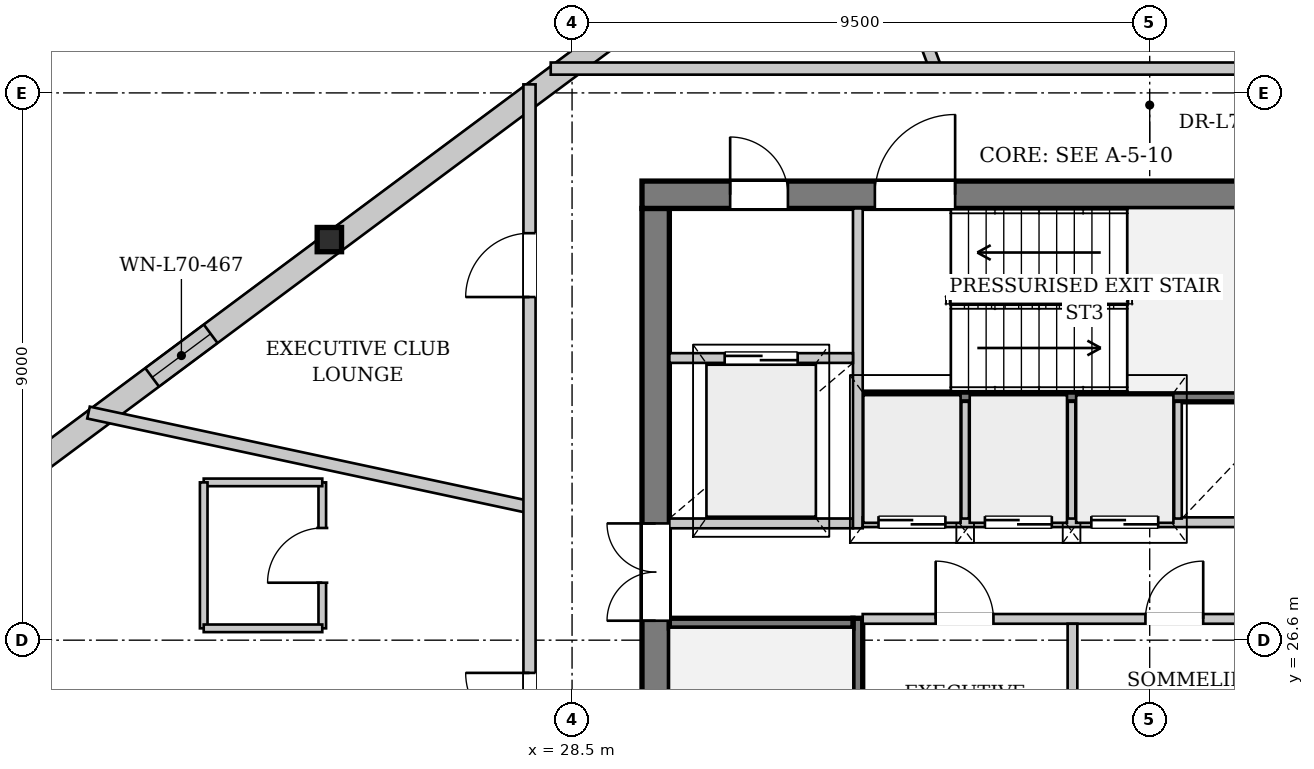
"""IFC4 building model, lengths in metres.
Left out: names, types, materials, properties, quantities, classifications, styles, units other than length and angle.
Written with IfcOpenShell. Run it as: python <this file> out.ifc"""

import sys

from ifc_helpers import new_model, si_unit, direction, frame, frame_2d, origin, origin_2d, place, context, subcontext, project, spatial, rectangle, i_section, extrude, source, transform, mapped, element, fill, save


model = new_model("IFC4")
c1 = context("Model", 3, precision=1e-05, world=origin(), true_north=direction((0.0, 1.0)))
c2 = subcontext(c1, "Body", "Model", "MODEL_VIEW")
j1 = project(units=[si_unit("LENGTHUNIT", "METRE"), si_unit("PLANEANGLEUNIT", "RADIAN")], contexts=[c1])
p1 = place(None, origin())
s1 = spatial("IfcSite", under=j1, at=p1, CompositionType="ELEMENT")
p2 = place(p1, origin())
s2 = spatial("IfcBuilding", under=s1, at=p2, CompositionType="ELEMENT")
p3 = place(p2, frame((0.0, 0.0, 263.3)))
s3 = spatial("IfcBuildingStorey", under=s2, at=p3, CompositionType="ELEMENT", Elevation=263.3)
m1 = source(origin(), c2, "Body", "SweptSolid", [
    extrude(i_section(OverallWidth=0.401, OverallDepth=0.399, WebThickness=0.022, FlangeThickness=0.034, at=origin_2d()), origin(), (0.0, 0.0, 1.0), 3.449),
])
p4 = place(p3, frame((24.526, 33.341, 0.0), z_axis=(-0.010051977317, -0.088839658682, 0.995995217256), x_axis=(0.99365964574, -0.112430015693, 0.0)))
e1 = element("IfcColumn", 1, at=p4, inside=s3, PredefinedType="COLUMN", context=c2, shape_type="MappedRepresentation", body=[
    mapped(m1, transform((0.0, 0.0, 0.0), x_axis=(1.0, 0.0, 0.0), y_axis=(0.0, 1.0, 0.0), z_axis=(0.0, 0.0, 1.0), scale=1.0)),
])
p5 = place(p3, frame((15.894, 26.68, 0.0), z_axis=(0.0, 0.0, 1.0), x_axis=(0.802229105353, 0.59701630005, 0.0)))
e2 = element("IfcWall", 2, at=p5, inside=s3, PredefinedType="SOLIDWALL", context=c2, shape_type="SweptSolid", body=[
    extrude(rectangle(XDim=21.802, YDim=0.38, at=frame_2d((10.901, 0.0))), origin(), (0.0, 0.0, 1.0), 2.872),
])
p6 = place(p5, frame((7.105, 0.0, 0.65)))
e3 = element("IfcOpeningElement", 3, at=p6, cuts=e2, PredefinedType="OPENING", context=c2, shape_type="SweptSolid", body=[
    extrude(rectangle(XDim=1.2, YDim=1.5, at=frame_2d((0.6, 0.75))), frame((0.0, 0.2, 0.0), z_axis=(0.0, -1.0, 0.0), x_axis=(1.0, 0.0, 0.0)), (0.0, 0.0, 1.0), 0.4),
])
p7 = place(p5, frame((16.698, 0.0, 0.65)))
e4 = element("IfcOpeningElement", 4, at=p7, cuts=e2, PredefinedType="OPENING", context=c2, shape_type="SweptSolid", body=[
    extrude(rectangle(XDim=1.2, YDim=1.5, at=frame_2d((0.6, 0.75))), frame((0.0, 0.2, 0.0), z_axis=(0.0, -1.0, 0.0), x_axis=(1.0, 0.0, 0.0)), (0.0, 0.0, 1.0), 0.4),
])
p8 = place(p3, frame((29.875, 19.5, 0.0), z_axis=(0.0, 0.0, 1.0), x_axis=(0.0, 1.0, 0.0)))
e5 = element("IfcWall", 5, at=p8, inside=s3, PredefinedType="SHEAR", context=c2, shape_type="SweptSolid", body=[
    extrude(rectangle(XDim=14.2, YDim=0.45, at=frame_2d((7.1, 0.0))), origin(), (0.0, 0.0, 1.0), 3.38),
])
p9 = place(p8, frame((7.42, 0.0, 0.0)))
e6 = element("IfcOpeningElement", 6, at=p9, cuts=e5, PredefinedType="OPENING", context=c2, shape_type="SweptSolid", body=[
    extrude(rectangle(XDim=1.6, YDim=2.2, at=frame_2d((0.8, 1.1))), frame((0.0, 0.235, 0.0), z_axis=(0.0, -1.0, 0.0), x_axis=(1.0, 0.0, 0.0)), (0.0, 0.0, 1.0), 0.47),
])
p10 = place(p3, frame((29.65, 33.925, 0.0), z_axis=(0.0, 0.0, 1.0), x_axis=(1.0, 0.0, 0.0)))
e7 = element("IfcWall", 7, at=p10, inside=s3, PredefinedType="SHEAR", context=c2, shape_type="SweptSolid", body=[
    extrude(rectangle(XDim=16.7, YDim=0.45, at=frame_2d((8.35, 0.0))), origin(), (0.0, 0.0, 1.0), 3.38),
])
p11 = place(p10, frame((1.45, 0.0, 0.0)))
e8 = element("IfcOpeningElement", 8, at=p11, cuts=e7, PredefinedType="OPENING", context=c2, shape_type="SweptSolid", body=[
    extrude(rectangle(XDim=0.95, YDim=2.1, at=frame_2d((0.475, 1.05))), frame((0.0, 0.235, 0.0), z_axis=(0.0, -1.0, 0.0), x_axis=(1.0, 0.0, 0.0)), (0.0, 0.0, 1.0), 0.47),
])
p12 = place(p10, frame((3.83, 0.0, 0.0)))
e9 = element("IfcOpeningElement", 9, at=p12, cuts=e7, PredefinedType="OPENING", context=c2, shape_type="SweptSolid", body=[
    extrude(rectangle(XDim=1.32, YDim=2.2, at=frame_2d((0.66, 1.1))), frame((0.0, 0.235, 0.0), z_axis=(0.0, -1.0, 0.0), x_axis=(1.0, 0.0, 0.0)), (0.0, 0.0, 1.0), 0.47),
])
p13 = place(p3, frame((33.2, 19.5, 0.0), z_axis=(0.0, 0.0, 1.0), x_axis=(0.0, 1.0, 0.0)))
e10 = element("IfcWall", 10, at=p13, inside=s3, PredefinedType="PARTITIONING", context=c2, shape_type="SweptSolid", body=[
    extrude(rectangle(XDim=7.46, YDim=0.16, at=frame_2d((3.73, 0.0))), origin(), (0.0, 0.0, 1.0), 3.38),
])
p14 = place(p13, frame((0.08, 0.0, 0.0)))
e11 = element("IfcOpeningElement", 11, at=p14, cuts=e10, PredefinedType="OPENING", context=c2, shape_type="SweptSolid", body=[
    extrude(rectangle(XDim=1.32, YDim=2.2, at=frame_2d((0.66, 1.1))), frame((0.0, 0.09, 0.0), z_axis=(0.0, -1.0, 0.0), x_axis=(1.0, 0.0, 0.0)), (0.0, 0.0, 1.0), 0.18),
])
p15 = place(p3, frame((30.1, 26.88, 0.0), z_axis=(0.0, 0.0, 1.0), x_axis=(1.0, 0.0, 0.0)))
e12 = element("IfcWall", 12, at=p15, inside=s3, PredefinedType="PARTITIONING", context=c2, shape_type="SweptSolid", body=[
    extrude(rectangle(XDim=3.02, YDim=0.16, at=frame_2d((1.51, 0.0))), origin(), (0.0, 0.0, 1.0), 3.38),
])
p16 = place(p3, frame((33.28, 30.6, 0.0), z_axis=(0.0, 0.0, 1.0), x_axis=(1.0, 0.0, 0.0)))
e13 = element("IfcWall", 13, at=p16, inside=s3, PredefinedType="PARTITIONING", context=c2, shape_type="SweptSolid", body=[
    extrude(rectangle(XDim=7.3, YDim=0.16, at=frame_2d((3.65, 0.0))), origin(), (0.0, 0.0, 1.0), 3.38),
])
p17 = place(p3, frame((30.1, 28.52, 0.0), z_axis=(0.0, 0.0, 1.0), x_axis=(1.0, 0.0, 0.0)))
e14 = element("IfcWall", 14, at=p17, inside=s3, PredefinedType="PARTITIONING", context=c2, shape_type="SweptSolid", body=[
    extrude(rectangle(XDim=3.02, YDim=0.16, at=frame_2d((1.51, 0.0))), origin(), (0.0, 0.0, 1.0), 3.38),
])
p18 = place(p3, frame((33.2, 28.44, 0.0), z_axis=(0.0, 0.0, 1.0), x_axis=(0.0, 1.0, 0.0)))
e15 = element("IfcWall", 15, at=p18, inside=s3, PredefinedType="PARTITIONING", context=c2, shape_type="SweptSolid", body=[
    extrude(rectangle(XDim=5.26, YDim=0.16, at=frame_2d((2.63, 0.0))), origin(), (0.0, 0.0, 1.0), 3.38),
])
p19 = place(p3, frame((30.1, 31.24, 0.0), z_axis=(0.0, 0.0, 1.0), x_axis=(1.0, 0.0, 0.0)))
e16 = element("IfcWall", 16, at=p19, inside=s3, PredefinedType="PARTITIONING", context=c2, shape_type="SweptSolid", body=[
    extrude(rectangle(XDim=3.02, YDim=0.16, at=frame_2d((1.51, 0.0))), origin(), (0.0, 0.0, 1.0), 3.38),
])
p20 = place(p19, frame((0.91, 0.0, 0.0)))
e17 = element("IfcOpeningElement", 17, at=p20, cuts=e16, PredefinedType="OPENING", context=c2, shape_type="SweptSolid", body=[
    extrude(rectangle(XDim=1.2, YDim=2.2, at=frame_2d((0.6, 1.1))), frame((0.0, 0.09, 0.0), z_axis=(0.0, -1.0, 0.0), x_axis=(1.0, 0.0, 0.0)), (0.0, 0.0, 1.0), 0.18),
])
p21 = place(p3, frame((33.28, 26.95, 0.0), z_axis=(0.0, 0.0, 1.0), x_axis=(1.0, 0.0, 0.0)))
e18 = element("IfcWall", 18, at=p21, inside=s3, PredefinedType="PARTITIONING", context=c2, shape_type="SweptSolid", body=[
    extrude(rectangle(XDim=9.44, YDim=0.16, at=frame_2d((4.72, 0.0))), origin(), (0.0, 0.0, 1.0), 3.38),
])
p22 = place(p21, frame((1.2, 0.0, 0.0)))
e19 = element("IfcOpeningElement", 19, at=p22, cuts=e18, PredefinedType="OPENING", context=c2, shape_type="SweptSolid", body=[
    extrude(rectangle(XDim=0.95, YDim=2.1, at=frame_2d((0.475, 1.05))), frame((0.0, 0.09, 0.0), z_axis=(0.0, -1.0, 0.0), x_axis=(1.0, 0.0, 0.0)), (0.0, 0.0, 1.0), 0.18),
])
p23 = place(p21, frame((4.65, 0.0, 0.0)))
e20 = element("IfcOpeningElement", 20, at=p23, cuts=e18, PredefinedType="OPENING", context=c2, shape_type="SweptSolid", body=[
    extrude(rectangle(XDim=0.95, YDim=2.1, at=frame_2d((0.475, 1.05))), frame((0.0, 0.09, 0.0), z_axis=(0.0, -1.0, 0.0), x_axis=(1.0, 0.0, 0.0)), (0.0, 0.0, 1.0), 0.18),
])
p24 = place(p21, frame((7.67, 0.0, 0.0)))
e21 = element("IfcOpeningElement", 21, at=p24, cuts=e18, PredefinedType="OPENING", context=c2, shape_type="SweptSolid", body=[
    extrude(rectangle(XDim=1.1, YDim=2.2, at=frame_2d((0.55, 1.1))), frame((0.0, 0.09, 0.0), z_axis=(0.0, -1.0, 0.0), x_axis=(1.0, 0.0, 0.0)), (0.0, 0.0, 1.0), 0.18),
])
p25 = place(p3, frame((36.73, 24.56, 0.0), z_axis=(0.0, 0.0, 1.0), x_axis=(0.0, 1.0, 0.0)))
e22 = element("IfcWall", 22, at=p25, inside=s3, PredefinedType="PARTITIONING", context=c2, shape_type="SweptSolid", body=[
    extrude(rectangle(XDim=2.31, YDim=0.16, at=frame_2d((1.155, 0.0))), origin(), (0.0, 0.0, 1.0), 3.38),
])
p26 = place(p3, frame((33.28, 28.54, 0.0), z_axis=(0.0, 0.0, 1.0), x_axis=(1.0, 0.0, 0.0)))
e23 = element("IfcWall", 23, at=p26, inside=s3, PredefinedType="PARTITIONING", context=c2, shape_type="SweptSolid", body=[
    extrude(rectangle(XDim=12.62, YDim=0.16, at=frame_2d((6.31, 0.0))), origin(), (0.0, 0.0, 1.0), 3.38),
])
p27 = place(p26, frame((0.26, 0.0, 0.0)))
e24 = element("IfcOpeningElement", 24, at=p27, cuts=e23, PredefinedType="OPENING", context=c2, shape_type="SweptSolid", body=[
    extrude(rectangle(XDim=1.1, YDim=2.2, at=frame_2d((0.55, 1.1))), frame((0.0, 0.09, 0.0), z_axis=(0.0, -1.0, 0.0), x_axis=(1.0, 0.0, 0.0)), (0.0, 0.0, 1.0), 0.18),
])
p28 = place(p26, frame((2.01, 0.0, 0.0)))
e25 = element("IfcOpeningElement", 25, at=p28, cuts=e23, PredefinedType="OPENING", context=c2, shape_type="SweptSolid", body=[
    extrude(rectangle(XDim=1.1, YDim=2.2, at=frame_2d((0.55, 1.1))), frame((0.0, 0.09, 0.0), z_axis=(0.0, -1.0, 0.0), x_axis=(1.0, 0.0, 0.0)), (0.0, 0.0, 1.0), 0.18),
])
p29 = place(p26, frame((3.76, 0.0, 0.0)))
e26 = element("IfcOpeningElement", 26, at=p29, cuts=e23, PredefinedType="OPENING", context=c2, shape_type="SweptSolid", body=[
    extrude(rectangle(XDim=1.1, YDim=2.2, at=frame_2d((0.55, 1.1))), frame((0.0, 0.09, 0.0), z_axis=(0.0, -1.0, 0.0), x_axis=(1.0, 0.0, 0.0)), (0.0, 0.0, 1.0), 0.18),
])
for number, where, z_axis, x_axis in (
    (27, (34.965, 28.6, 0.0), (0.0, 0.0, 1.0), (0.0, 1.0, 0.0)),
    (28, (36.715, 28.6, 0.0), (0.0, 0.0, 1.0), (0.0, 1.0, 0.0)),
    (29, (38.465, 28.6, 0.0), (0.0, 0.0, 1.0), (0.0, 1.0, 0.0)),
):
    element("IfcWall", number, at=place(p3, frame(where, z_axis=z_axis, x_axis=x_axis)), inside=s3, PredefinedType="PARTITIONING", context=c2, shape_type="SweptSolid", body=[
        extrude(rectangle(XDim=1.92, YDim=0.125, at=frame_2d((0.96, 0.0))), origin(), (0.0, 0.0, 1.0), 3.38),
    ])
p30 = place(p3, frame((34.479, 36.0, 0.0), z_axis=(0.0, 0.0, 1.0), x_axis=(-0.350701737224, 0.936487208406, 0.0)))
e30 = element("IfcWall", 30, at=p30, inside=s3, PredefinedType="PARTITIONING", context=c2, shape_type="SweptSolid", body=[
    extrude(rectangle(XDim=3.934, YDim=0.2, at=frame_2d((1.967, 0.0))), origin(), (0.0, 0.0, 1.0), 2.915),
])
p31 = place(p3, frame((27.8, 28.788, 0.0), z_axis=(0.0, 0.0, 1.0), x_axis=(-0.977765791521, 0.209699921153, 0.0)))
e31 = element("IfcWall", 31, at=p31, inside=s3, PredefinedType="PARTITIONING", context=c2, shape_type="SweptSolid", body=[
    extrude(rectangle(XDim=7.417, YDim=0.2, at=frame_2d((3.709, 0.0))), origin(), (0.0, 0.0, 1.0), 3.38),
])
p32 = place(p3, frame((24.392, 26.795, 0.0), z_axis=(0.0, 0.0, 1.0), x_axis=(0.0, 1.0, 0.0)))
e32 = element("IfcWall", 32, at=p32, inside=s3, PredefinedType="PARTITIONING", context=c2, shape_type="SweptSolid", body=[
    extrude(rectangle(XDim=2.4, YDim=0.125, at=frame_2d((1.2, 0.0))), origin(), (0.0, 0.0, 1.0), 3.38),
])
p33 = place(p32, frame((0.75, 0.0, 0.0)))
e33 = element("IfcOpeningElement", 33, at=p33, cuts=e32, PredefinedType="OPENING", context=c2, shape_type="SweptSolid", body=[
    extrude(rectangle(XDim=0.9, YDim=2.1, at=frame_2d((0.45, 1.05))), frame((0.0, 0.073, 0.0), z_axis=(0.0, -1.0, 0.0), x_axis=(1.0, 0.0, 0.0)), (0.0, 0.0, 1.0), 0.145),
])
p34 = place(p3, frame((24.392, 29.195, 0.0), z_axis=(0.0, 0.0, 1.0), x_axis=(-1.0, 0.0, 0.0)))
e34 = element("IfcWall", 34, at=p34, inside=s3, PredefinedType="PARTITIONING", context=c2, shape_type="SweptSolid", body=[
    extrude(rectangle(XDim=1.95, YDim=0.125, at=frame_2d((0.975, 0.0))), origin(), (0.0, 0.0, 1.0), 3.38),
])
p35 = place(p3, frame((22.442, 29.195, 0.0), z_axis=(0.0, 0.0, 1.0), x_axis=(0.0, -1.0, 0.0)))
e35 = element("IfcWall", 35, at=p35, inside=s3, PredefinedType="PARTITIONING", context=c2, shape_type="SweptSolid", body=[
    extrude(rectangle(XDim=2.4, YDim=0.125, at=frame_2d((1.2, 0.0))), origin(), (0.0, 0.0, 1.0), 3.38),
])
p36 = place(p3, frame((22.442, 26.795, 0.0), z_axis=(0.0, 0.0, 1.0), x_axis=(1.0, 0.0, 0.0)))
e36 = element("IfcWall", 36, at=p36, inside=s3, PredefinedType="PARTITIONING", context=c2, shape_type="SweptSolid", body=[
    extrude(rectangle(XDim=1.95, YDim=0.125, at=frame_2d((0.975, 0.0))), origin(), (0.0, 0.0, 1.0), 3.055),
])
p37 = place(p3, frame((27.8, 17.2, 0.0), z_axis=(0.0, 0.0, 1.0), x_axis=(0.0, 1.0, 0.0)))
e37 = element("IfcWall", 37, at=p37, inside=s3, PredefinedType="PARTITIONING", context=c2, shape_type="SweptSolid", body=[
    extrude(rectangle(XDim=18.54, YDim=0.2, at=frame_2d((9.27, 0.0))), origin(), (0.0, 0.0, 1.0), 3.38),
])
p38 = place(p37, frame((15.043, 0.0, 0.0)))
e38 = element("IfcOpeningElement", 38, at=p38, cuts=e37, PredefinedType="OPENING", context=c2, shape_type="SweptSolid", body=[
    extrude(rectangle(XDim=1.05, YDim=2.2, at=frame_2d((0.525, 1.1))), frame((0.0, 0.11, 0.0), z_axis=(0.0, -1.0, 0.0), x_axis=(1.0, 0.0, 0.0)), (0.0, 0.0, 1.0), 0.22),
])
p39 = place(p37, frame((7.812, 0.0, 0.0)))
e39 = element("IfcOpeningElement", 39, at=p39, cuts=e37, PredefinedType="OPENING", context=c2, shape_type="SweptSolid", body=[
    extrude(rectangle(XDim=1.05, YDim=2.2, at=frame_2d((0.525, 1.1))), frame((0.0, 0.11, 0.0), z_axis=(0.0, -1.0, 0.0), x_axis=(1.0, 0.0, 0.0)), (0.0, 0.0, 1.0), 0.22),
])
p40 = place(p3, frame((28.149, 36.0, 0.0), z_axis=(0.0, 0.0, 1.0), x_axis=(1.0, 0.0, 0.0)))
e40 = element("IfcWall", 40, at=p40, inside=s3, PredefinedType="PARTITIONING", context=c2, shape_type="SweptSolid", body=[
    extrude(rectangle(XDim=12.851, YDim=0.2, at=frame_2d((6.425, 0.0))), origin(), (0.0, 0.0, 1.0), 3.38),
])
p41 = place(p40, frame((11.501, 0.0, 0.0)))
e41 = element("IfcOpeningElement", 41, at=p41, cuts=e40, PredefinedType="OPENING", context=c2, shape_type="SweptSolid", body=[
    extrude(rectangle(XDim=1.05, YDim=2.2, at=frame_2d((0.525, 1.1))), frame((0.0, 0.11, 0.0), z_axis=(0.0, -1.0, 0.0), x_axis=(1.0, 0.0, 0.0)), (0.0, 0.0, 1.0), 0.22),
])
m2 = source(origin(), c2, "Body", "SweptSolid", [
    extrude(rectangle(XDim=1.2, YDim=1.5, at=frame_2d((0.6, 0.75))), frame((0.0, 0.03, 0.0), z_axis=(0.0, -1.0, 0.0), x_axis=(1.0, 0.0, 0.0)), (0.0, 0.0, 1.0), 0.06),
])
p42 = place(p6, origin())
e42 = element("IfcWindow", 42, at=p42, inside=s3, PartitioningType="SINGLE_PANEL", PredefinedType="WINDOW", context=c2, shape_type="MappedRepresentation", body=[
    mapped(m2, transform((0.0, 0.0, 0.0), x_axis=(1.0, 0.0, 0.0), y_axis=(0.0, 1.0, 0.0), z_axis=(0.0, 0.0, 1.0), scale=1.0)),
])
fill(e3, e42)
m3 = source(origin(), c2, "Body", "SweptSolid", [
    extrude(rectangle(XDim=1.6, YDim=2.2, at=frame_2d((0.8, 1.1))), frame((0.0, 0.025, 0.0), z_axis=(0.0, -1.0, 0.0), x_axis=(1.0, 0.0, 0.0)), (0.0, 0.0, 1.0), 0.05),
])
p43 = place(p9, origin())
e43 = element("IfcDoor", 43, at=p43, inside=s3, OperationType="DOUBLE_DOOR_SINGLE_SWING", PredefinedType="DOOR", context=c2, shape_type="MappedRepresentation", body=[
    mapped(m3, transform((0.0, 0.0, 0.0), x_axis=(1.0, 0.0, 0.0), y_axis=(0.0, 1.0, 0.0), z_axis=(0.0, 0.0, 1.0), scale=1.0)),
])
fill(e6, e43)
m4 = source(origin(), c2, "Body", "SweptSolid", [
    extrude(rectangle(XDim=0.95, YDim=2.1, at=frame_2d((0.475, 1.05))), frame((0.0, 0.025, 0.0), z_axis=(0.0, -1.0, 0.0), x_axis=(1.0, 0.0, 0.0)), (0.0, 0.0, 1.0), 0.05),
])
p44 = place(p11, origin())
e44 = element("IfcDoor", 44, at=p44, inside=s3, OperationType="SINGLE_SWING_LEFT", PredefinedType="DOOR", context=c2, shape_type="MappedRepresentation", body=[
    mapped(m4, transform((0.0, 0.0, 0.0), x_axis=(1.0, 0.0, 0.0), y_axis=(0.0, 1.0, 0.0), z_axis=(0.0, 0.0, 1.0), scale=1.0)),
])
fill(e8, e44)
m5 = source(origin(), c2, "Body", "SweptSolid", [
    extrude(rectangle(XDim=1.32, YDim=2.2, at=frame_2d((0.66, 1.1))), frame((0.0, 0.025, 0.0), z_axis=(0.0, -1.0, 0.0), x_axis=(1.0, 0.0, 0.0)), (0.0, 0.0, 1.0), 0.05),
])
p45 = place(p12, origin())
e45 = element("IfcDoor", 45, at=p45, inside=s3, OperationType="SINGLE_SWING_RIGHT", PredefinedType="DOOR", context=c2, shape_type="MappedRepresentation", body=[
    mapped(m5, transform((0.0, 0.0, 0.0), x_axis=(1.0, 0.0, 0.0), y_axis=(0.0, 1.0, 0.0), z_axis=(0.0, 0.0, 1.0), scale=1.0)),
])
fill(e9, e45)
m6 = source(origin(), c2, "Body", "SweptSolid", [
    extrude(rectangle(XDim=1.2, YDim=2.2, at=frame_2d((0.6, 1.1))), frame((0.0, 0.025, 0.0), z_axis=(0.0, -1.0, 0.0), x_axis=(1.0, 0.0, 0.0)), (0.0, 0.0, 1.0), 0.05),
])
p46 = place(p20, origin())
e46 = element("IfcDoor", 46, at=p46, inside=s3, OperationType="DOUBLE_DOOR_SLIDING", PredefinedType="DOOR", context=c2, shape_type="MappedRepresentation", body=[
    mapped(m6, transform((0.0, 0.0, 0.0), x_axis=(1.0, 0.0, 0.0), y_axis=(0.0, 1.0, 0.0), z_axis=(0.0, 0.0, 1.0), scale=1.0)),
])
fill(e17, e46)
p47 = place(p22, origin())
e47 = element("IfcDoor", 47, at=p47, inside=s3, OperationType="SINGLE_SWING_LEFT", PredefinedType="DOOR", context=c2, shape_type="MappedRepresentation", body=[
    mapped(m4, transform((0.0, 0.0, 0.0), x_axis=(1.0, 0.0, 0.0), y_axis=(0.0, 1.0, 0.0), z_axis=(0.0, 0.0, 1.0), scale=1.0)),
])
fill(e19, e47)
p48 = place(p23, origin())
e48 = element("IfcDoor", 48, at=p48, inside=s3, OperationType="SINGLE_SWING_RIGHT", PredefinedType="DOOR", context=c2, shape_type="MappedRepresentation", body=[
    mapped(m4, transform((0.0, 0.0, 0.0), x_axis=(1.0, 0.0, 0.0), y_axis=(0.0, 1.0, 0.0), z_axis=(0.0, 0.0, 1.0), scale=1.0)),
])
fill(e20, e48)
m7 = source(origin(), c2, "Body", "SweptSolid", [
    extrude(rectangle(XDim=1.1, YDim=2.2, at=frame_2d((0.55, 1.1))), frame((0.0, 0.025, 0.0), z_axis=(0.0, -1.0, 0.0), x_axis=(1.0, 0.0, 0.0)), (0.0, 0.0, 1.0), 0.05),
])
p49 = place(p27, origin())
e49 = element("IfcDoor", 49, at=p49, inside=s3, OperationType="DOUBLE_DOOR_SLIDING", PredefinedType="DOOR", context=c2, shape_type="MappedRepresentation", body=[
    mapped(m7, transform((0.0, 0.0, 0.0), x_axis=(1.0, 0.0, 0.0), y_axis=(0.0, 1.0, 0.0), z_axis=(0.0, 0.0, 1.0), scale=1.0)),
])
fill(e24, e49)
p50 = place(p28, origin())
e50 = element("IfcDoor", 50, at=p50, inside=s3, OperationType="DOUBLE_DOOR_SLIDING", PredefinedType="DOOR", context=c2, shape_type="MappedRepresentation", body=[
    mapped(m7, transform((0.0, 0.0, 0.0), x_axis=(1.0, 0.0, 0.0), y_axis=(0.0, 1.0, 0.0), z_axis=(0.0, 0.0, 1.0), scale=1.0)),
])
fill(e25, e50)
p51 = place(p29, origin())
e51 = element("IfcDoor", 51, at=p51, inside=s3, OperationType="DOUBLE_DOOR_SLIDING", PredefinedType="DOOR", context=c2, shape_type="MappedRepresentation", body=[
    mapped(m7, transform((0.0, 0.0, 0.0), x_axis=(1.0, 0.0, 0.0), y_axis=(0.0, 1.0, 0.0), z_axis=(0.0, 0.0, 1.0), scale=1.0)),
])
fill(e26, e51)
m8 = source(origin(), c2, "Body", "SweptSolid", [
    extrude(rectangle(XDim=0.9, YDim=2.1, at=frame_2d((0.45, 1.05))), frame((0.0, 0.025, 0.0), z_axis=(0.0, -1.0, 0.0), x_axis=(1.0, 0.0, 0.0)), (0.0, 0.0, 1.0), 0.05),
])
p52 = place(p33, origin())
e52 = element("IfcDoor", 52, at=p52, inside=s3, OperationType="SINGLE_SWING_LEFT", PredefinedType="DOOR", context=c2, shape_type="MappedRepresentation", body=[
    mapped(m8, transform((0.0, 0.0, 0.0), x_axis=(1.0, 0.0, 0.0), y_axis=(0.0, 1.0, 0.0), z_axis=(0.0, 0.0, 1.0), scale=1.0)),
])
fill(e33, e52)
m9 = source(origin(), c2, "Body", "SweptSolid", [
    extrude(rectangle(XDim=1.05, YDim=2.2, at=frame_2d((0.525, 1.1))), frame((0.0, 0.025, 0.0), z_axis=(0.0, -1.0, 0.0), x_axis=(1.0, 0.0, 0.0)), (0.0, 0.0, 1.0), 0.05),
])
p53 = place(p38, origin())
e53 = element("IfcDoor", 53, at=p53, inside=s3, OperationType="SINGLE_SWING_LEFT", PredefinedType="DOOR", context=c2, shape_type="MappedRepresentation", body=[
    mapped(m9, transform((0.0, 0.0, 0.0), x_axis=(1.0, 0.0, 0.0), y_axis=(0.0, 1.0, 0.0), z_axis=(0.0, 0.0, 1.0), scale=1.0)),
])
fill(e38, e53)
p54 = place(p39, origin())
e54 = element("IfcDoor", 54, at=p54, inside=s3, OperationType="SINGLE_SWING_RIGHT", PredefinedType="DOOR", context=c2, shape_type="MappedRepresentation", body=[
    mapped(m9, transform((0.0, 0.0, 0.0), x_axis=(1.0, 0.0, 0.0), y_axis=(0.0, 1.0, 0.0), z_axis=(0.0, 0.0, 1.0), scale=1.0)),
])
fill(e39, e54)
save(model, sys.argv[1])
